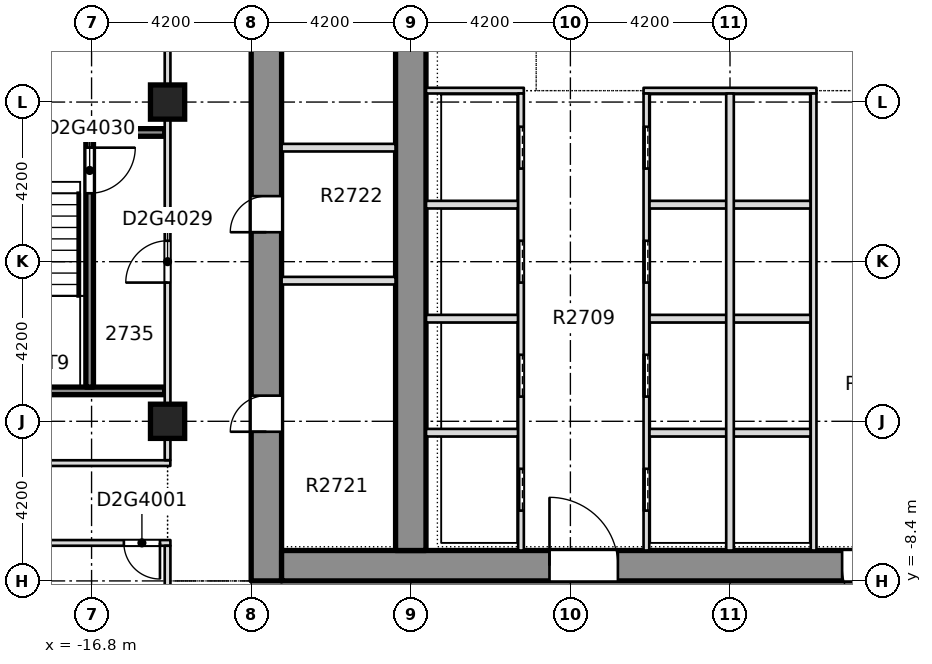
"""IFC4 building model, lengths in metres.
Left out: names, types, materials, properties, quantities, classifications, styles, units other than length and angle.
Written with IfcOpenShell. Run it as: python <this file> out.ifc"""

import sys

from ifc_helpers import new_model, si_unit, direction, frame, frame_2d, origin, origin_2d, place, context, subcontext, project, spatial, rectangle, extrude, element, fill, save


model = new_model("IFC4")
c1 = context("Model", 3, precision=1e-05, world=origin(), true_north=direction((0.0, 1.0)))
c2 = subcontext(c1, "Body", "Model", "MODEL_VIEW")
j1 = project(units=[si_unit("LENGTHUNIT", "METRE"), si_unit("PLANEANGLEUNIT", "RADIAN")], contexts=[c1])
p1 = place(None, origin())
s1 = spatial("IfcSite", under=j1, at=p1, CompositionType="ELEMENT")
p2 = place(p1, origin())
s2 = spatial("IfcBuilding", under=s1, at=p2, CompositionType="ELEMENT")
p3 = place(p2, frame((0.0, 0.0, 108.0)))
s3 = spatial("IfcBuildingStorey", under=s2, at=p3, CompositionType="ELEMENT", Elevation=108.0)
p4 = place(p3, frame((-12.2, -8.4, -0.32), z_axis=(0.0, 0.0, 1.0), x_axis=(0.0, 1.0, 0.0)))
e1 = element("IfcWall", 1, at=p4, inside=s3, PredefinedType="SHEAR", context=c2, shape_type="SweptSolid", body=[
    extrude(rectangle(XDim=30.15, YDim=0.8, at=frame_2d((15.075, 0.0))), origin(), (0.0, 0.0, 1.0), 3.45),
])
p5 = place(p4, frame((3.925, 0.0, 0.32)))
e2 = element("IfcOpeningElement", 2, at=p5, cuts=e1, PredefinedType="OPENING", context=c2, shape_type="SweptSolid", body=[
    extrude(rectangle(XDim=0.95, YDim=2.1, at=frame_2d((0.475, 1.05))), frame((0.0, 0.41, 0.0), z_axis=(0.0, -1.0, 0.0), x_axis=(1.0, 0.0, 0.0)), (0.0, 0.0, 1.0), 0.82),
])
p6 = place(p4, frame((9.175, 0.0, 0.32)))
e3 = element("IfcOpeningElement", 3, at=p6, cuts=e1, PredefinedType="OPENING", context=c2, shape_type="SweptSolid", body=[
    extrude(rectangle(XDim=0.95, YDim=2.1, at=frame_2d((0.475, 1.05))), frame((0.0, 0.41, 0.0), z_axis=(0.0, -1.0, 0.0), x_axis=(1.0, 0.0, 0.0)), (0.0, 0.0, 1.0), 0.82),
])
p7 = place(p4, frame((14.525, 0.0, 0.32)))
e4 = element("IfcOpeningElement", 4, at=p7, cuts=e1, PredefinedType="OPENING", context=c2, shape_type="SweptSolid", body=[
    extrude(rectangle(XDim=0.95, YDim=2.1, at=frame_2d((0.475, 1.05))), frame((0.0, 0.41, 0.0), z_axis=(0.0, -1.0, 0.0), x_axis=(1.0, 0.0, 0.0)), (0.0, 0.0, 1.0), 0.82),
])
p8 = place(p4, frame((22.225, 0.0, 0.32)))
e5 = element("IfcOpeningElement", 5, at=p8, cuts=e1, PredefinedType="OPENING", context=c2, shape_type="SweptSolid", body=[
    extrude(rectangle(XDim=0.95, YDim=2.1, at=frame_2d((0.475, 1.05))), frame((0.0, 0.41, 0.0), z_axis=(0.0, -1.0, 0.0), x_axis=(1.0, 0.0, 0.0)), (0.0, 0.0, 1.0), 0.82),
])
p9 = place(p4, frame((26.25, 0.0, 0.32)))
e6 = element("IfcOpeningElement", 6, at=p9, cuts=e1, PredefinedType="OPENING", context=c2, shape_type="SweptSolid", body=[
    extrude(rectangle(XDim=0.95, YDim=2.1, at=frame_2d((0.475, 1.05))), frame((0.0, 0.41, 0.0), z_axis=(0.0, -1.0, 0.0), x_axis=(1.0, 0.0, 0.0)), (0.0, 0.0, 1.0), 0.82),
])
p10 = place(p4, frame((19.3, 0.0, 0.32)))
e7 = element("IfcOpeningElement", 7, at=p10, cuts=e1, PredefinedType="OPENING", context=c2, shape_type="SweptSolid", body=[
    extrude(rectangle(XDim=1.2, YDim=2.1, at=frame_2d((0.6, 1.05))), frame((0.0, 0.41, 0.0), z_axis=(0.0, -1.0, 0.0), x_axis=(1.0, 0.0, 0.0)), (0.0, 0.0, 1.0), 0.82),
])
p11 = place(p3, frame((-11.8, -8.0, -0.32), z_axis=(0.0, 0.0, 1.0), x_axis=(1.0, 0.0, 0.0)))
e8 = element("IfcWall", 8, at=p11, inside=s3, PredefinedType="SHEAR", context=c2, shape_type="SweptSolid", body=[
    extrude(rectangle(XDim=23.6, YDim=0.8, at=frame_2d((11.8, 0.0))), origin(), (0.0, 0.0, 1.0), 3.45),
])
p12 = place(p11, frame((7.05, 0.0, 0.32)))
e9 = element("IfcOpeningElement", 9, at=p12, cuts=e8, PredefinedType="OPENING", context=c2, shape_type="SweptSolid", body=[
    extrude(rectangle(XDim=1.8, YDim=2.1, at=frame_2d((0.9, 1.05))), frame((0.0, 0.41, 0.0), z_axis=(0.0, -1.0, 0.0), x_axis=(1.0, 0.0, 0.0)), (0.0, 0.0, 1.0), 0.82),
])
p13 = place(p11, frame((14.75, 0.0, 0.32)))
e10 = element("IfcOpeningElement", 10, at=p13, cuts=e8, PredefinedType="OPENING", context=c2, shape_type="SweptSolid", body=[
    extrude(rectangle(XDim=1.8, YDim=2.1, at=frame_2d((0.9, 1.05))), frame((0.0, 0.41, 0.0), z_axis=(0.0, -1.0, 0.0), x_axis=(1.0, 0.0, 0.0)), (0.0, 0.0, 1.0), 0.82),
])
p14 = place(p3, frame((-8.4, -7.6, -0.32), z_axis=(0.0, 0.0, 1.0), x_axis=(0.0, 1.0, 0.0)))
e11 = element("IfcWall", 11, at=p14, inside=s3, PredefinedType="SHEAR", context=c2, shape_type="SweptSolid", body=[
    extrude(rectangle(XDim=28.55, YDim=0.8, at=frame_2d((14.275, 0.0))), origin(), (0.0, 0.0, 1.0), 3.45),
])
p15 = place(p14, frame((18.5, 0.0, 0.32)))
e12 = element("IfcOpeningElement", 12, at=p15, cuts=e11, PredefinedType="OPENING", context=c2, shape_type="SweptSolid", body=[
    extrude(rectangle(XDim=1.2, YDim=2.1, at=frame_2d((0.6, 1.05))), frame((0.0, 0.41, 0.0), z_axis=(0.0, -1.0, 0.0), x_axis=(1.0, 0.0, 0.0)), (0.0, 0.0, 1.0), 0.82),
])
for number, where, z_axis, x_axis in (
    (13, (-14.8, -4.2, -0.32), (0.0, 0.0, 1.0), (1.0, 0.0, 0.0)),
    (14, (-14.8, 4.2, -0.32), (0.0, 0.0, 1.0), (1.0, 0.0, 0.0)),
):
    element("IfcColumn", number, at=place(p3, frame(where, z_axis=z_axis, x_axis=x_axis)), inside=s3, PredefinedType="COLUMN", context=c2, shape_type="SweptSolid", body=[
        extrude(rectangle(XDim=0.9, YDim=0.9, at=origin_2d()), origin(), (0.0, 0.0, 1.0), 3.45),
    ])
p16 = place(p3, frame((-25.75, -7.4, 0.0), z_axis=(0.0, 0.0, 1.0), x_axis=(1.0, 0.0, 0.0)))
e15 = element("IfcWall", 15, at=p16, inside=s3, PredefinedType="PARTITIONING", context=c2, shape_type="SweptSolid", body=[
    extrude(rectangle(XDim=11.025, YDim=0.15, at=frame_2d((5.512, 0.0))), origin(), (0.0, 0.0, 1.0), 3.13),
])
p17 = place(p16, frame((9.8, 0.0, 0.0)))
e16 = element("IfcOpeningElement", 16, at=p17, cuts=e15, PredefinedType="OPENING", context=c2, shape_type="SweptSolid", body=[
    extrude(rectangle(XDim=0.95, YDim=2.1, at=frame_2d((0.475, 1.05))), frame((0.0, 0.085, 0.0), z_axis=(0.0, -1.0, 0.0), x_axis=(1.0, 0.0, 0.0)), (0.0, 0.0, 1.0), 0.17),
])
p18 = place(p3, frame((-25.75, -5.3, 0.0), z_axis=(0.0, 0.0, 1.0), x_axis=(1.0, 0.0, 0.0)))
e17 = element("IfcWall", 17, at=p18, inside=s3, PredefinedType="PARTITIONING", context=c2, shape_type="SweptSolid", body=[
    extrude(rectangle(XDim=11.023, YDim=0.15, at=frame_2d((5.511, 0.0))), origin(), (0.0, 0.0, 1.0), 3.13),
])
p19 = place(p3, frame((-20.4, -3.4, 0.0), z_axis=(0.0, 0.0, 1.0), x_axis=(1.0, 0.0, 0.0)))
e18 = element("IfcWall", 18, at=p19, inside=s3, PredefinedType="SOLIDWALL", context=c2, shape_type="SweptSolid", body=[
    extrude(rectangle(XDim=5.523, YDim=0.2, at=frame_2d((2.761, 0.0))), origin(), (0.0, 0.0, 1.0), 3.13),
])
p20 = place(p3, frame((-20.45, 3.4, 0.0), z_axis=(0.0, 0.0, 1.0), x_axis=(1.0, 0.0, 0.0)))
e19 = element("IfcWall", 19, at=p20, inside=s3, PredefinedType="SOLIDWALL", context=c2, shape_type="SweptSolid", body=[
    extrude(rectangle(XDim=5.575, YDim=0.2, at=frame_2d((2.788, 0.0))), origin(), (0.0, 0.0, 1.0), 3.13),
])
p21 = place(p3, frame((-16.85, -3.3, 0.0), z_axis=(0.0, 0.0, 1.0), x_axis=(0.0, 1.0, 0.0)))
e20 = element("IfcWall", 20, at=p21, inside=s3, PredefinedType="SOLIDWALL", context=c2, shape_type="SweptSolid", body=[
    extrude(rectangle(XDim=6.6, YDim=0.2, at=frame_2d((3.3, 0.0))), origin(), (0.0, 0.0, 1.0), 3.13),
])
p22 = place(p21, frame((5.1, 0.0, 0.0)))
e21 = element("IfcOpeningElement", 21, at=p22, cuts=e20, PredefinedType="OPENING", context=c2, shape_type="SweptSolid", body=[
    extrude(rectangle(XDim=1.2, YDim=2.1, at=frame_2d((0.6, 1.05))), frame((0.0, 0.11, 0.0), z_axis=(0.0, -1.0, 0.0), x_axis=(1.0, 0.0, 0.0)), (0.0, 0.0, 1.0), 0.22),
])
p23 = place(p3, frame((-14.8, -10.46, 0.0), z_axis=(0.0, 0.0, 1.0), x_axis=(0.0, 1.0, 0.0)))
e22 = element("IfcWall", 22, at=p23, inside=s3, PredefinedType="PARTITIONING", context=c2, shape_type="SweptSolid", body=[
    extrude(rectangle(XDim=2.985, YDim=0.15, at=frame_2d((1.492, 0.0))), origin(), (0.0, 0.0, 1.0), 3.13),
])
p24 = place(p3, frame((-14.8, -5.223, 0.0), z_axis=(0.0, 0.0, 1.0), x_axis=(0.0, 1.0, 0.0)))
e23 = element("IfcWall", 23, at=p24, inside=s3, PredefinedType="PARTITIONING", context=c2, shape_type="SweptSolid", body=[
    extrude(rectangle(XDim=18.523, YDim=0.15, at=frame_2d((9.261, 0.0))), origin(), (0.0, 0.0, 1.0), 3.13),
])
p25 = place(p24, frame((13.098, 0.0, 0.0)))
e24 = element("IfcOpeningElement", 24, at=p25, cuts=e23, PredefinedType="OPENING", context=c2, shape_type="SweptSolid", body=[
    extrude(rectangle(XDim=1.0, YDim=2.1, at=frame_2d((0.5, 1.05))), frame((0.0, 0.085, 0.0), z_axis=(0.0, -1.0, 0.0), x_axis=(1.0, 0.0, 0.0)), (0.0, 0.0, 1.0), 0.17),
])
p26 = place(p24, frame((4.673, 0.0, 0.0)))
e25 = element("IfcOpeningElement", 25, at=p26, cuts=e23, PredefinedType="OPENING", context=c2, shape_type="SweptSolid", body=[
    extrude(rectangle(XDim=1.1, YDim=2.1, at=frame_2d((0.55, 1.05))), frame((0.0, 0.085, 0.0), z_axis=(0.0, -1.0, 0.0), x_axis=(1.0, 0.0, 0.0)), (0.0, 0.0, 1.0), 0.17),
])
p27 = place(p3, frame((-7.999, -4.5, 0.0), z_axis=(0.0, 0.0, 1.0), x_axis=(1.0, 0.0, 0.0)))
e26 = element("IfcWall", 26, at=p27, inside=s3, PredefinedType="PARTITIONING", context=c2, shape_type="SweptSolid", body=[
    extrude(rectangle(XDim=2.424, YDim=0.2, at=frame_2d((1.212, 0.0))), origin(), (0.0, 0.0, 1.0), 3.13),
])
p28 = place(p3, frame((-2.125, -4.5, 0.0), z_axis=(0.0, 0.0, 1.0), x_axis=(1.0, 0.0, 0.0)))
e27 = element("IfcWall", 27, at=p28, inside=s3, PredefinedType="PARTITIONING", context=c2, shape_type="SweptSolid", body=[
    extrude(rectangle(XDim=4.25, YDim=0.2, at=frame_2d((2.125, 0.0))), origin(), (0.0, 0.0, 1.0), 3.13),
])
p29 = place(p3, frame((-7.999, -1.5, 0.0), z_axis=(0.0, 0.0, 1.0), x_axis=(1.0, 0.0, 0.0)))
e28 = element("IfcWall", 28, at=p29, inside=s3, PredefinedType="PARTITIONING", context=c2, shape_type="SweptSolid", body=[
    extrude(rectangle(XDim=2.424, YDim=0.2, at=frame_2d((1.212, 0.0))), origin(), (0.0, 0.0, 1.0), 3.13),
])
p30 = place(p3, frame((-2.125, -1.5, 0.0), z_axis=(0.0, 0.0, 1.0), x_axis=(1.0, 0.0, 0.0)))
e29 = element("IfcWall", 29, at=p30, inside=s3, PredefinedType="PARTITIONING", context=c2, shape_type="SweptSolid", body=[
    extrude(rectangle(XDim=4.25, YDim=0.2, at=frame_2d((2.125, 0.0))), origin(), (0.0, 0.0, 1.0), 3.13),
])
p31 = place(p3, frame((-7.999, 1.5, 0.0), z_axis=(0.0, 0.0, 1.0), x_axis=(1.0, 0.0, 0.0)))
e30 = element("IfcWall", 30, at=p31, inside=s3, PredefinedType="PARTITIONING", context=c2, shape_type="SweptSolid", body=[
    extrude(rectangle(XDim=2.424, YDim=0.2, at=frame_2d((1.212, 0.0))), origin(), (0.0, 0.0, 1.0), 3.13),
])
p32 = place(p3, frame((-2.125, 1.5, 0.0), z_axis=(0.0, 0.0, 1.0), x_axis=(1.0, 0.0, 0.0)))
e31 = element("IfcWall", 31, at=p32, inside=s3, PredefinedType="PARTITIONING", context=c2, shape_type="SweptSolid", body=[
    extrude(rectangle(XDim=4.25, YDim=0.2, at=frame_2d((2.125, 0.0))), origin(), (0.0, 0.0, 1.0), 3.13),
])
p33 = place(p3, frame((-7.999, 4.5, 0.0), z_axis=(0.0, 0.0, 1.0), x_axis=(1.0, 0.0, 0.0)))
e32 = element("IfcWall", 32, at=p33, inside=s3, PredefinedType="PARTITIONING", context=c2, shape_type="SweptSolid", body=[
    extrude(rectangle(XDim=2.574, YDim=0.15, at=frame_2d((1.287, 0.0))), origin(), (0.0, 0.0, 1.0), 3.13),
])
p34 = place(p3, frame((-2.275, 4.5, 0.0), z_axis=(0.0, 0.0, 1.0), x_axis=(1.0, 0.0, 0.0)))
e33 = element("IfcWall", 33, at=p34, inside=s3, PredefinedType="PARTITIONING", context=c2, shape_type="SweptSolid", body=[
    extrude(rectangle(XDim=4.55, YDim=0.15, at=frame_2d((2.275, 0.0))), origin(), (0.0, 0.0, 1.0), 3.13),
])
p35 = place(p3, frame((-5.5, -7.599, 0.0), z_axis=(0.0, 0.0, 1.0), x_axis=(0.0, 1.0, 0.0)))
e34 = element("IfcWall", 34, at=p35, inside=s3, PredefinedType="PARTITIONING", context=c2, shape_type="SweptSolid", body=[
    extrude(rectangle(XDim=12.024, YDim=0.15, at=frame_2d((6.012, 0.0))), origin(), (0.0, 0.0, 1.0), 3.13),
])
p36 = place(p35, frame((1.049, 0.0, 0.0)))
e35 = element("IfcOpeningElement", 35, at=p36, cuts=e34, PredefinedType="OPENING", context=c2, shape_type="SweptSolid", body=[
    extrude(rectangle(XDim=1.1, YDim=2.1, at=frame_2d((0.55, 1.05))), frame((0.0, 0.085, 0.0), z_axis=(0.0, -1.0, 0.0), x_axis=(1.0, 0.0, 0.0)), (0.0, 0.0, 1.0), 0.17),
])
p37 = place(p35, frame((4.049, 0.0, 0.0)))
e36 = element("IfcOpeningElement", 36, at=p37, cuts=e34, PredefinedType="OPENING", context=c2, shape_type="SweptSolid", body=[
    extrude(rectangle(XDim=1.1, YDim=2.1, at=frame_2d((0.55, 1.05))), frame((0.0, 0.085, 0.0), z_axis=(0.0, -1.0, 0.0), x_axis=(1.0, 0.0, 0.0)), (0.0, 0.0, 1.0), 0.17),
])
p38 = place(p35, frame((7.049, 0.0, 0.0)))
e37 = element("IfcOpeningElement", 37, at=p38, cuts=e34, PredefinedType="OPENING", context=c2, shape_type="SweptSolid", body=[
    extrude(rectangle(XDim=1.1, YDim=2.1, at=frame_2d((0.55, 1.05))), frame((0.0, 0.085, 0.0), z_axis=(0.0, -1.0, 0.0), x_axis=(1.0, 0.0, 0.0)), (0.0, 0.0, 1.0), 0.17),
])
p39 = place(p35, frame((10.049, 0.0, 0.0)))
e38 = element("IfcOpeningElement", 38, at=p39, cuts=e34, PredefinedType="OPENING", context=c2, shape_type="SweptSolid", body=[
    extrude(rectangle(XDim=1.1, YDim=2.1, at=frame_2d((0.55, 1.05))), frame((0.0, 0.085, 0.0), z_axis=(0.0, -1.0, 0.0), x_axis=(1.0, 0.0, 0.0)), (0.0, 0.0, 1.0), 0.17),
])
p40 = place(p3, frame((-2.2, -7.599, 0.0), z_axis=(0.0, 0.0, 1.0), x_axis=(0.0, 1.0, 0.0)))
e39 = element("IfcWall", 39, at=p40, inside=s3, PredefinedType="PARTITIONING", context=c2, shape_type="SweptSolid", body=[
    extrude(rectangle(XDim=12.024, YDim=0.15, at=frame_2d((6.012, 0.0))), origin(), (0.0, 0.0, 1.0), 3.13),
])
p41 = place(p40, frame((1.049, 0.0, 0.0)))
e40 = element("IfcOpeningElement", 40, at=p41, cuts=e39, PredefinedType="OPENING", context=c2, shape_type="SweptSolid", body=[
    extrude(rectangle(XDim=1.1, YDim=2.1, at=frame_2d((0.55, 1.05))), frame((0.0, 0.085, 0.0), z_axis=(0.0, -1.0, 0.0), x_axis=(1.0, 0.0, 0.0)), (0.0, 0.0, 1.0), 0.17),
])
p42 = place(p40, frame((4.049, 0.0, 0.0)))
e41 = element("IfcOpeningElement", 41, at=p42, cuts=e39, PredefinedType="OPENING", context=c2, shape_type="SweptSolid", body=[
    extrude(rectangle(XDim=1.1, YDim=2.1, at=frame_2d((0.55, 1.05))), frame((0.0, 0.085, 0.0), z_axis=(0.0, -1.0, 0.0), x_axis=(1.0, 0.0, 0.0)), (0.0, 0.0, 1.0), 0.17),
])
p43 = place(p40, frame((7.049, 0.0, 0.0)))
e42 = element("IfcOpeningElement", 42, at=p43, cuts=e39, PredefinedType="OPENING", context=c2, shape_type="SweptSolid", body=[
    extrude(rectangle(XDim=1.1, YDim=2.1, at=frame_2d((0.55, 1.05))), frame((0.0, 0.085, 0.0), z_axis=(0.0, -1.0, 0.0), x_axis=(1.0, 0.0, 0.0)), (0.0, 0.0, 1.0), 0.17),
])
p44 = place(p40, frame((10.049, 0.0, 0.0)))
e43 = element("IfcOpeningElement", 43, at=p44, cuts=e39, PredefinedType="OPENING", context=c2, shape_type="SweptSolid", body=[
    extrude(rectangle(XDim=1.1, YDim=2.1, at=frame_2d((0.55, 1.05))), frame((0.0, 0.085, 0.0), z_axis=(0.0, -1.0, 0.0), x_axis=(1.0, 0.0, 0.0)), (0.0, 0.0, 1.0), 0.17),
])
p45 = place(p3, frame((0.0, -7.599, 0.0), z_axis=(0.0, 0.0, 1.0), x_axis=(0.0, 1.0, 0.0)))
e44 = element("IfcWall", 44, at=p45, inside=s3, PredefinedType="PARTITIONING", context=c2, shape_type="SweptSolid", body=[
    extrude(rectangle(XDim=12.024, YDim=0.2, at=frame_2d((6.012, 0.0))), origin(), (0.0, 0.0, 1.0), 3.13),
])
p46 = place(p3, frame((2.2, -7.599, 0.0), z_axis=(0.0, 0.0, 1.0), x_axis=(0.0, 1.0, 0.0)))
e45 = element("IfcWall", 45, at=p46, inside=s3, PredefinedType="PARTITIONING", context=c2, shape_type="SweptSolid", body=[
    extrude(rectangle(XDim=12.024, YDim=0.15, at=frame_2d((6.012, 0.0))), origin(), (0.0, 0.0, 1.0), 3.13),
])
for number, where, z_axis, x_axis in (
    (46, (-11.799, -0.5, 0.0), (0.0, 0.0, 1.0), (1.0, 0.0, 0.0)),
    (47, (-11.799, 3.0, 0.0), (0.0, 0.0, 1.0), (1.0, 0.0, 0.0)),
):
    element("IfcWall", number, at=place(p3, frame(where, z_axis=z_axis, x_axis=x_axis)), inside=s3, PredefinedType="PARTITIONING", context=c2, shape_type="SweptSolid", body=[
        extrude(rectangle(XDim=2.998, YDim=0.2, at=frame_2d((1.499, 0.0))), origin(), (0.0, 0.0, 1.0), 3.13),
    ])
p47 = place(p17, origin())
e48 = element("IfcDoor", 48, at=p47, inside=s3, OperationType="SINGLE_SWING_RIGHT", PredefinedType="DOOR", context=c2, shape_type="SweptSolid", body=[
    extrude(rectangle(XDim=0.95, YDim=2.1, at=frame_2d((0.475, 1.05))), frame((0.0, 0.025, 0.0), z_axis=(0.0, -1.0, 0.0), x_axis=(1.0, 0.0, 0.0)), (0.0, 0.0, 1.0), 0.05),
])
fill(e16, e48)
p48 = place(p26, origin())
e49 = element("IfcDoor", 49, at=p48, inside=s3, OperationType="SINGLE_SWING_LEFT", PredefinedType="DOOR", context=c2, shape_type="SweptSolid", body=[
    extrude(rectangle(XDim=1.1, YDim=2.1, at=frame_2d((0.55, 1.05))), frame((0.0, 0.025, 0.0), z_axis=(0.0, -1.0, 0.0), x_axis=(1.0, 0.0, 0.0)), (0.0, 0.0, 1.0), 0.05),
])
fill(e25, e49)
p49 = place(p22, origin())
e50 = element("IfcDoor", 50, at=p49, inside=s3, OperationType="SINGLE_SWING_RIGHT", PredefinedType="DOOR", context=c2, shape_type="SweptSolid", body=[
    extrude(rectangle(XDim=1.2, YDim=2.1, at=frame_2d((0.6, 1.05))), frame((0.0, 0.025, 0.0), z_axis=(0.0, -1.0, 0.0), x_axis=(1.0, 0.0, 0.0)), (0.0, 0.0, 1.0), 0.05),
])
fill(e21, e50)
p50 = place(p36, origin())
e51 = element("IfcDoor", 51, at=p50, inside=s3, OperationType="SLIDING_TO_LEFT", PredefinedType="DOOR", context=c2, shape_type="SweptSolid", body=[
    extrude(rectangle(XDim=1.1, YDim=2.1, at=frame_2d((0.55, 1.05))), frame((0.0, 0.025, 0.0), z_axis=(0.0, -1.0, 0.0), x_axis=(1.0, 0.0, 0.0)), (0.0, 0.0, 1.0), 0.05),
])
fill(e35, e51)
p51 = place(p37, origin())
e52 = element("IfcDoor", 52, at=p51, inside=s3, OperationType="SLIDING_TO_LEFT", PredefinedType="DOOR", context=c2, shape_type="SweptSolid", body=[
    extrude(rectangle(XDim=1.1, YDim=2.1, at=frame_2d((0.55, 1.05))), frame((0.0, 0.025, 0.0), z_axis=(0.0, -1.0, 0.0), x_axis=(1.0, 0.0, 0.0)), (0.0, 0.0, 1.0), 0.05),
])
fill(e36, e52)
p52 = place(p38, origin())
e53 = element("IfcDoor", 53, at=p52, inside=s3, OperationType="SLIDING_TO_LEFT", PredefinedType="DOOR", context=c2, shape_type="SweptSolid", body=[
    extrude(rectangle(XDim=1.1, YDim=2.1, at=frame_2d((0.55, 1.05))), frame((0.0, 0.025, 0.0), z_axis=(0.0, -1.0, 0.0), x_axis=(1.0, 0.0, 0.0)), (0.0, 0.0, 1.0), 0.05),
])
fill(e37, e53)
p53 = place(p39, origin())
e54 = element("IfcDoor", 54, at=p53, inside=s3, OperationType="SLIDING_TO_LEFT", PredefinedType="DOOR", context=c2, shape_type="SweptSolid", body=[
    extrude(rectangle(XDim=1.1, YDim=2.1, at=frame_2d((0.55, 1.05))), frame((0.0, 0.025, 0.0), z_axis=(0.0, -1.0, 0.0), x_axis=(1.0, 0.0, 0.0)), (0.0, 0.0, 1.0), 0.05),
])
fill(e38, e54)
p54 = place(p41, origin())
e55 = element("IfcDoor", 55, at=p54, inside=s3, OperationType="SLIDING_TO_LEFT", PredefinedType="DOOR", context=c2, shape_type="SweptSolid", body=[
    extrude(rectangle(XDim=1.1, YDim=2.1, at=frame_2d((0.55, 1.05))), frame((0.0, 0.025, 0.0), z_axis=(0.0, -1.0, 0.0), x_axis=(1.0, 0.0, 0.0)), (0.0, 0.0, 1.0), 0.05),
])
fill(e40, e55)
p55 = place(p42, origin())
e56 = element("IfcDoor", 56, at=p55, inside=s3, OperationType="SLIDING_TO_LEFT", PredefinedType="DOOR", context=c2, shape_type="SweptSolid", body=[
    extrude(rectangle(XDim=1.1, YDim=2.1, at=frame_2d((0.55, 1.05))), frame((0.0, 0.025, 0.0), z_axis=(0.0, -1.0, 0.0), x_axis=(1.0, 0.0, 0.0)), (0.0, 0.0, 1.0), 0.05),
])
fill(e41, e56)
p56 = place(p43, origin())
e57 = element("IfcDoor", 57, at=p56, inside=s3, OperationType="SLIDING_TO_LEFT", PredefinedType="DOOR", context=c2, shape_type="SweptSolid", body=[
    extrude(rectangle(XDim=1.1, YDim=2.1, at=frame_2d((0.55, 1.05))), frame((0.0, 0.025, 0.0), z_axis=(0.0, -1.0, 0.0), x_axis=(1.0, 0.0, 0.0)), (0.0, 0.0, 1.0), 0.05),
])
fill(e42, e57)
p57 = place(p44, origin())
e58 = element("IfcDoor", 58, at=p57, inside=s3, OperationType="SLIDING_TO_LEFT", PredefinedType="DOOR", context=c2, shape_type="SweptSolid", body=[
    extrude(rectangle(XDim=1.1, YDim=2.1, at=frame_2d((0.55, 1.05))), frame((0.0, 0.025, 0.0), z_axis=(0.0, -1.0, 0.0), x_axis=(1.0, 0.0, 0.0)), (0.0, 0.0, 1.0), 0.05),
])
fill(e43, e58)
p58 = place(p12, origin())
e59 = element("IfcDoor", 59, at=p58, inside=s3, OperationType="SINGLE_SWING_LEFT", PredefinedType="DOOR", context=c2, shape_type="SweptSolid", body=[
    extrude(rectangle(XDim=1.8, YDim=2.1, at=frame_2d((0.9, 1.05))), frame((0.0, 0.025, 0.0), z_axis=(0.0, -1.0, 0.0), x_axis=(1.0, 0.0, 0.0)), (0.0, 0.0, 1.0), 0.05),
])
fill(e9, e59)
p59 = place(p13, origin())
e60 = element("IfcDoor", 60, at=p59, inside=s3, OperationType="SINGLE_SWING_LEFT", PredefinedType="DOOR", context=c2, shape_type="SweptSolid", body=[
    extrude(rectangle(XDim=1.8, YDim=2.1, at=frame_2d((0.9, 1.05))), frame((0.0, 0.025, 0.0), z_axis=(0.0, -1.0, 0.0), x_axis=(1.0, 0.0, 0.0)), (0.0, 0.0, 1.0), 0.05),
])
fill(e10, e60)
p60 = place(p5, origin())
e61 = element("IfcDoor", 61, at=p60, inside=s3, OperationType="SINGLE_SWING_LEFT", PredefinedType="DOOR", context=c2, shape_type="SweptSolid", body=[
    extrude(rectangle(XDim=0.95, YDim=2.1, at=frame_2d((0.475, 1.05))), frame((0.0, 0.025, 0.0), z_axis=(0.0, -1.0, 0.0), x_axis=(1.0, 0.0, 0.0)), (0.0, 0.0, 1.0), 0.05),
])
fill(e2, e61)
p61 = place(p6, origin())
e62 = element("IfcDoor", 62, at=p61, inside=s3, OperationType="SINGLE_SWING_LEFT", PredefinedType="DOOR", context=c2, shape_type="SweptSolid", body=[
    extrude(rectangle(XDim=0.95, YDim=2.1, at=frame_2d((0.475, 1.05))), frame((0.0, 0.025, 0.0), z_axis=(0.0, -1.0, 0.0), x_axis=(1.0, 0.0, 0.0)), (0.0, 0.0, 1.0), 0.05),
])
fill(e3, e62)
save(model, sys.argv[1])
